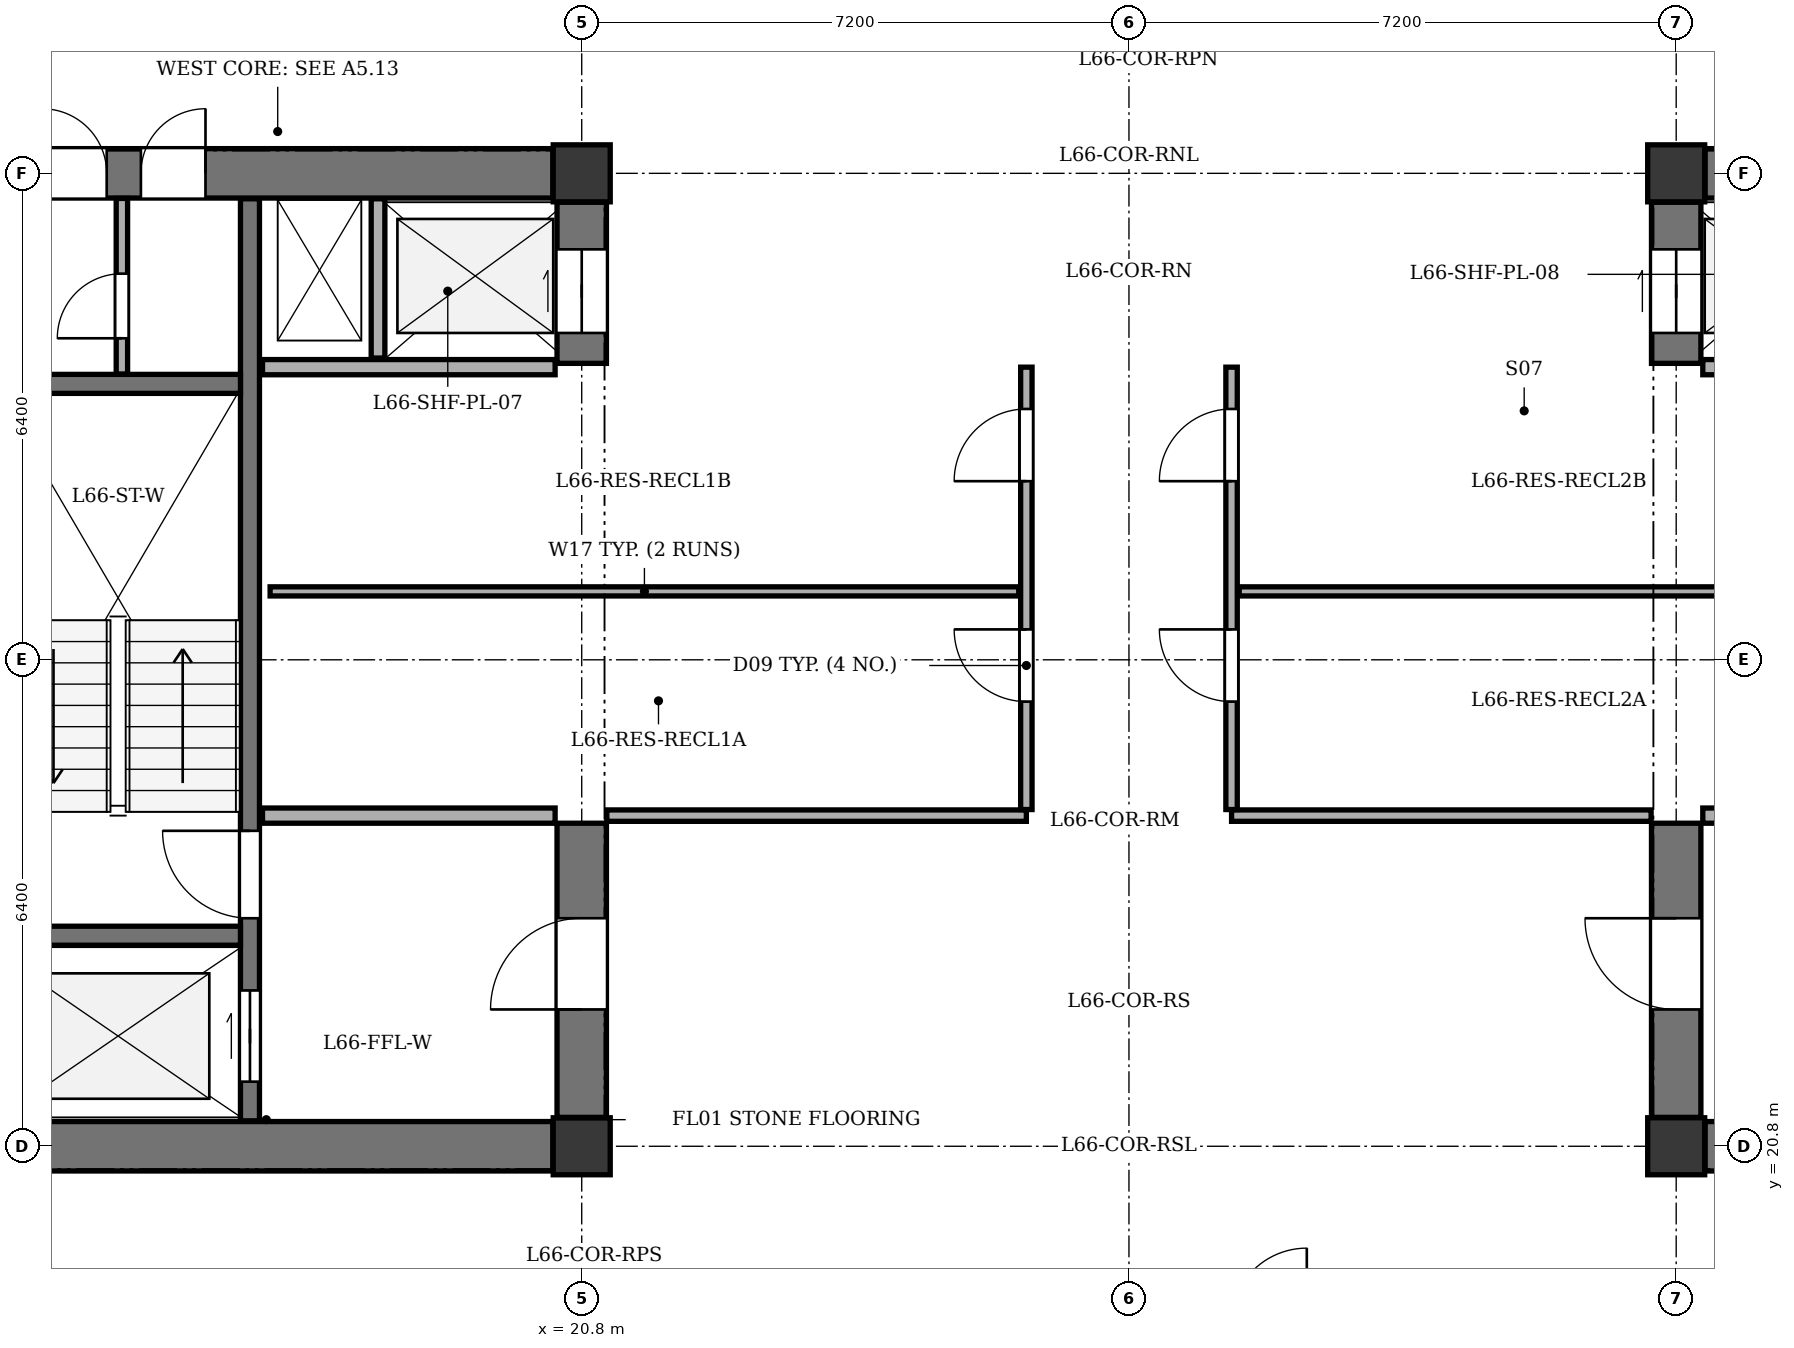
"""IFC4 building model, lengths in metres.
Left out: names, types, materials, properties, quantities, classifications, styles, units other than length and angle.
Written with IfcOpenShell. Run it as: python <this file> out.ifc"""

import sys

from ifc_helpers import new_model, si_unit, direction, frame, frame_2d, origin, origin_2d, place, context, subcontext, project, spatial, rectangle, extrude, element, fill, save


model = new_model("IFC4")
c1 = context("Model", 3, precision=1e-05, world=origin(), true_north=direction((0.0, 1.0)))
c2 = subcontext(c1, "Body", "Model", "MODEL_VIEW")
j1 = project(units=[si_unit("LENGTHUNIT", "METRE"), si_unit("PLANEANGLEUNIT", "RADIAN")], contexts=[c1])
p1 = place(None, origin())
s1 = spatial("IfcSite", under=j1, at=p1, CompositionType="ELEMENT")
p2 = place(p1, origin())
s2 = spatial("IfcBuilding", under=s1, at=p2, CompositionType="ELEMENT")
p3 = place(p2, frame((0.0, 0.0, 251.7)))
s3 = spatial("IfcBuildingStorey", under=s2, at=p3, CompositionType="ELEMENT", Elevation=251.7)
for number, where, z_axis, x_axis in (
    (1, (20.8, 20.8, 0.0), (0.0, 0.0, 1.0), (1.0, 0.0, 0.0)),
    (2, (20.8, 33.6, 0.0), (0.0, 0.0, 1.0), (1.0, 0.0, 0.0)),
    (3, (35.2, 20.8, 0.0), (0.0, 0.0, 1.0), (1.0, 0.0, 0.0)),
    (4, (35.2, 33.6, 0.0), (0.0, 0.0, 1.0), (1.0, 0.0, 0.0)),
):
    element("IfcColumn", number, at=place(p3, frame(where, z_axis=z_axis, x_axis=x_axis)), inside=s3, PredefinedType="COLUMN", context=c2, shape_type="SweptSolid", body=[
        extrude(rectangle(XDim=0.75, YDim=0.75, at=origin_2d()), origin(), (0.0, 0.0, 1.0), 3.4),
    ])
p4 = place(p3, frame((14.7, 16.03, 0.0), z_axis=(0.0, 0.0, 1.0), x_axis=(-0.707106781187, 0.707106781187, 0.0)))
e5 = element("IfcWall", 5, at=p4, inside=s3, PredefinedType="STANDARD", context=c2, shape_type="SweptSolid", body=[
    extrude(rectangle(XDim=5.402, YDim=0.32, at=frame_2d((2.701, 0.0))), origin(), (0.0, 0.0, 1.0), 2.725),
])
p5 = place(p4, frame((2.001, 0.0, 0.75)))
e6 = element("IfcOpeningElement", 6, at=p5, cuts=e5, PredefinedType="OPENING", context=c2, shape_type="SweptSolid", body=[
    extrude(rectangle(XDim=1.4, YDim=1.65, at=frame_2d((0.7, 0.825))), frame((0.0, 0.17, 0.0), z_axis=(0.0, -1.0, 0.0), x_axis=(1.0, 0.0, 0.0)), (0.0, 0.0, 1.0), 0.34),
])
p6 = place(p3, frame((13.18, 20.8, 0.0), z_axis=(0.0, 0.0, 1.0), x_axis=(1.0, 0.0, 0.0)))
e7 = element("IfcWall", 7, at=p6, inside=s3, PredefinedType="SHEAR", context=c2, shape_type="SweptSolid", body=[
    extrude(rectangle(XDim=7.24, YDim=0.65, at=frame_2d((3.62, 0.0))), origin(), (0.0, 0.0, 1.0), 3.1),
])
p7 = place(p3, frame((13.18, 33.6, 0.0), z_axis=(0.0, 0.0, 1.0), x_axis=(1.0, 0.0, 0.0)))
e8 = element("IfcWall", 8, at=p7, inside=s3, PredefinedType="SHEAR", context=c2, shape_type="SweptSolid", body=[
    extrude(rectangle(XDim=7.24, YDim=0.65, at=frame_2d((3.62, 0.0))), origin(), (0.0, 0.0, 1.0), 3.1),
])
p8 = place(p7, frame((0.52, 0.0, 0.0)))
e9 = element("IfcOpeningElement", 9, at=p8, cuts=e8, PredefinedType="OPENING", context=c2, shape_type="SweptSolid", body=[
    extrude(rectangle(XDim=0.85, YDim=2.02, at=frame_2d((0.425, 1.01))), frame((0.0, 0.335, 0.0), z_axis=(0.0, -1.0, 0.0), x_axis=(1.0, 0.0, 0.0)), (0.0, 0.0, 1.0), 0.67),
])
p9 = place(p7, frame((1.82, 0.0, 0.0)))
e10 = element("IfcOpeningElement", 10, at=p9, cuts=e8, PredefinedType="OPENING", context=c2, shape_type="SweptSolid", body=[
    extrude(rectangle(XDim=0.85, YDim=2.02, at=frame_2d((0.425, 1.01))), frame((0.0, 0.335, 0.0), z_axis=(0.0, -1.0, 0.0), x_axis=(1.0, 0.0, 0.0)), (0.0, 0.0, 1.0), 0.67),
])
p10 = place(p3, frame((20.8, 21.18, 0.0), z_axis=(0.0, 0.0, 1.0), x_axis=(0.0, 1.0, 0.0)))
e11 = element("IfcWall", 11, at=p10, inside=s3, PredefinedType="SHEAR", context=c2, shape_type="SweptSolid", body=[
    extrude(rectangle(XDim=3.87, YDim=0.65, at=frame_2d((1.935, 0.0))), origin(), (0.0, 0.0, 1.0), 3.1),
])
p11 = place(p10, frame((1.42, 0.0, 0.0)))
e12 = element("IfcOpeningElement", 12, at=p11, cuts=e11, PredefinedType="OPENING", context=c2, shape_type="SweptSolid", body=[
    extrude(rectangle(XDim=1.2, YDim=2.15, at=frame_2d((0.6, 1.075))), frame((0.0, 0.335, 0.0), z_axis=(0.0, -1.0, 0.0), x_axis=(1.0, 0.0, 0.0)), (0.0, 0.0, 1.0), 0.67),
])
p12 = place(p3, frame((20.8, 31.1, 0.0), z_axis=(0.0, 0.0, 1.0), x_axis=(0.0, 1.0, 0.0)))
e13 = element("IfcWall", 13, at=p12, inside=s3, PredefinedType="SHEAR", context=c2, shape_type="SweptSolid", body=[
    extrude(rectangle(XDim=2.12, YDim=0.65, at=frame_2d((1.06, 0.0))), origin(), (0.0, 0.0, 1.0), 3.1),
])
p13 = place(p12, frame((0.4, 0.0, 0.0)))
e14 = element("IfcOpeningElement", 14, at=p13, cuts=e13, PredefinedType="OPENING", context=c2, shape_type="SweptSolid", body=[
    extrude(rectangle(XDim=1.1, YDim=2.1, at=frame_2d((0.55, 1.05))), frame((0.0, 0.335, 0.0), z_axis=(0.0, -1.0, 0.0), x_axis=(1.0, 0.0, 0.0)), (0.0, 0.0, 1.0), 0.67),
])
p14 = place(p3, frame((16.435, 21.135, 0.0), z_axis=(0.0, 0.0, 1.0), x_axis=(0.0, 1.0, 0.0)))
e15 = element("IfcWall", 15, at=p14, inside=s3, PredefinedType="SHEAR", context=c2, shape_type="SweptSolid", body=[
    extrude(rectangle(XDim=12.13, YDim=0.25, at=frame_2d((6.065, 0.0))), origin(), (0.0, 0.0, 1.0), 3.1),
])
p15 = place(p14, frame((0.515, 0.0, 0.0)))
e16 = element("IfcOpeningElement", 16, at=p15, cuts=e15, PredefinedType="OPENING", context=c2, shape_type="SweptSolid", body=[
    extrude(rectangle(XDim=1.2, YDim=2.15, at=frame_2d((0.6, 1.075))), frame((0.0, 0.135, 0.0), z_axis=(0.0, -1.0, 0.0), x_axis=(1.0, 0.0, 0.0)), (0.0, 0.0, 1.0), 0.27),
])
p16 = place(p14, frame((2.665, 0.0, 0.0)))
e17 = element("IfcOpeningElement", 17, at=p16, cuts=e15, PredefinedType="OPENING", context=c2, shape_type="SweptSolid", body=[
    extrude(rectangle(XDim=1.15, YDim=2.15, at=frame_2d((0.575, 1.075))), frame((0.0, 0.135, 0.0), z_axis=(0.0, -1.0, 0.0), x_axis=(1.0, 0.0, 0.0)), (0.0, 0.0, 1.0), 0.27),
])
for number, where, z_axis, x_axis in (
    (18, (13.135, 23.57, 0.0), (0.0, 0.0, 1.0), (1.0, 0.0, 0.0)),
    (19, (13.135, 30.83, 0.0), (0.0, 0.0, 1.0), (1.0, 0.0, 0.0)),
):
    element("IfcWall", number, at=place(p3, frame(where, z_axis=z_axis, x_axis=x_axis)), inside=s3, PredefinedType="SHEAR", context=c2, shape_type="SweptSolid", body=[
        extrude(rectangle(XDim=3.175, YDim=0.25, at=frame_2d((1.587, 0.0))), origin(), (0.0, 0.0, 1.0), 3.1),
    ])
for number, where, z_axis, x_axis in (
    (20, (16.6, 25.15, 0.0), (0.0, 0.0, 1.0), (1.0, 0.0, 0.0)),
    (21, (16.6, 31.05, 0.0), (0.0, 0.0, 1.0), (1.0, 0.0, 0.0)),
):
    element("IfcWall", number, at=place(p3, frame(where, z_axis=z_axis, x_axis=x_axis)), inside=s3, PredefinedType="SOLIDWALL", context=c2, shape_type="SweptSolid", body=[
        extrude(rectangle(XDim=3.85, YDim=0.2, at=frame_2d((1.925, 0.0))), origin(), (0.0, 0.0, 1.0), 3.1),
    ])
p17 = place(p3, frame((18.12, 31.17, 0.0), z_axis=(0.0, 0.0, 1.0), x_axis=(0.0, 1.0, 0.0)))
e22 = element("IfcWall", 22, at=p17, inside=s3, PredefinedType="PARTITIONING", context=c2, shape_type="SweptSolid", body=[
    extrude(rectangle(XDim=2.095, YDim=0.18, at=frame_2d((1.047, 0.0))), origin(), (0.0, 0.0, 1.0), 3.1),
])
p18 = place(p3, frame((35.58, 20.8, 0.0), z_axis=(0.0, 0.0, 1.0), x_axis=(1.0, 0.0, 0.0)))
e23 = element("IfcWall", 23, at=p18, inside=s3, PredefinedType="SHEAR", context=c2, shape_type="SweptSolid", body=[
    extrude(rectangle(XDim=7.24, YDim=0.65, at=frame_2d((3.62, 0.0))), origin(), (0.0, 0.0, 1.0), 3.1),
])
p19 = place(p3, frame((35.58, 33.6, 0.0), z_axis=(0.0, 0.0, 1.0), x_axis=(1.0, 0.0, 0.0)))
e24 = element("IfcWall", 24, at=p19, inside=s3, PredefinedType="SHEAR", context=c2, shape_type="SweptSolid", body=[
    extrude(rectangle(XDim=7.24, YDim=0.65, at=frame_2d((3.62, 0.0))), origin(), (0.0, 0.0, 1.0), 3.1),
])
p20 = place(p19, frame((4.82, 0.0, 0.0)))
e25 = element("IfcOpeningElement", 25, at=p20, cuts=e24, PredefinedType="OPENING", context=c2, shape_type="SweptSolid", body=[
    extrude(rectangle(XDim=1.3, YDim=2.15, at=frame_2d((0.65, 1.075))), frame((0.0, 0.335, 0.0), z_axis=(0.0, -1.0, 0.0), x_axis=(1.0, 0.0, 0.0)), (0.0, 0.0, 1.0), 0.67),
])
p21 = place(p19, frame((2.62, 0.0, 0.0)))
e26 = element("IfcOpeningElement", 26, at=p21, cuts=e24, PredefinedType="OPENING", context=c2, shape_type="SweptSolid", body=[
    extrude(rectangle(XDim=0.85, YDim=2.02, at=frame_2d((0.425, 1.01))), frame((0.0, 0.335, 0.0), z_axis=(0.0, -1.0, 0.0), x_axis=(1.0, 0.0, 0.0)), (0.0, 0.0, 1.0), 0.67),
])
p22 = place(p3, frame((35.2, 21.18, 0.0), z_axis=(0.0, 0.0, 1.0), x_axis=(0.0, 1.0, 0.0)))
e27 = element("IfcWall", 27, at=p22, inside=s3, PredefinedType="SHEAR", context=c2, shape_type="SweptSolid", body=[
    extrude(rectangle(XDim=3.87, YDim=0.65, at=frame_2d((1.935, 0.0))), origin(), (0.0, 0.0, 1.0), 3.1),
])
p23 = place(p22, frame((1.42, 0.0, 0.0)))
e28 = element("IfcOpeningElement", 28, at=p23, cuts=e27, PredefinedType="OPENING", context=c2, shape_type="SweptSolid", body=[
    extrude(rectangle(XDim=1.2, YDim=2.15, at=frame_2d((0.6, 1.075))), frame((0.0, 0.335, 0.0), z_axis=(0.0, -1.0, 0.0), x_axis=(1.0, 0.0, 0.0)), (0.0, 0.0, 1.0), 0.67),
])
p24 = place(p3, frame((35.2, 31.1, 0.0), z_axis=(0.0, 0.0, 1.0), x_axis=(0.0, 1.0, 0.0)))
e29 = element("IfcWall", 29, at=p24, inside=s3, PredefinedType="SHEAR", context=c2, shape_type="SweptSolid", body=[
    extrude(rectangle(XDim=2.12, YDim=0.65, at=frame_2d((1.06, 0.0))), origin(), (0.0, 0.0, 1.0), 3.1),
])
p25 = place(p24, frame((0.4, 0.0, 0.0)))
e30 = element("IfcOpeningElement", 30, at=p25, cuts=e29, PredefinedType="OPENING", context=c2, shape_type="SweptSolid", body=[
    extrude(rectangle(XDim=1.1, YDim=2.1, at=frame_2d((0.55, 1.05))), frame((0.0, 0.335, 0.0), z_axis=(0.0, -1.0, 0.0), x_axis=(1.0, 0.0, 0.0)), (0.0, 0.0, 1.0), 0.67),
])
p26 = place(p3, frame((35.55, 25.15, 0.0), z_axis=(0.0, 0.0, 1.0), x_axis=(1.0, 0.0, 0.0)))
e31 = element("IfcWall", 31, at=p26, inside=s3, PredefinedType="SOLIDWALL", context=c2, shape_type="SweptSolid", body=[
    extrude(rectangle(XDim=3.85, YDim=0.2, at=frame_2d((1.925, 0.0))), origin(), (0.0, 0.0, 1.0), 3.1),
])
p27 = place(p3, frame((35.55, 31.05, 0.0), z_axis=(0.0, 0.0, 1.0), x_axis=(1.0, 0.0, 0.0)))
e32 = element("IfcWall", 32, at=p27, inside=s3, PredefinedType="SOLIDWALL", context=c2, shape_type="SweptSolid", body=[
    extrude(rectangle(XDim=2.25, YDim=0.2, at=frame_2d((1.125, 0.0))), origin(), (0.0, 0.0, 1.0), 3.1),
])
p28 = place(p3, frame((14.75, 30.96, 0.0), z_axis=(0.0, 0.0, 1.0), x_axis=(0.0, 1.0, 0.0)))
e33 = element("IfcWall", 33, at=p28, inside=s3, PredefinedType="PARTITIONING", context=c2, shape_type="SweptSolid", body=[
    extrude(rectangle(XDim=2.31, YDim=0.15, at=frame_2d((1.155, 0.0))), origin(), (0.0, 0.0, 1.0), 3.1),
])
p29 = place(p28, frame((0.47, 0.0, 0.0)))
e34 = element("IfcOpeningElement", 34, at=p29, cuts=e33, PredefinedType="OPENING", context=c2, shape_type="SweptSolid", body=[
    extrude(rectangle(XDim=0.85, YDim=2.02, at=frame_2d((0.425, 1.01))), frame((0.0, 0.085, 0.0), z_axis=(0.0, -1.0, 0.0), x_axis=(1.0, 0.0, 0.0)), (0.0, 0.0, 1.0), 0.17),
])
for number, where, z_axis, x_axis in (
    (35, (21.13, 25.15, 0.0), (0.0, 0.0, 1.0), (1.0, 0.0, 0.0)),
    (36, (29.35, 25.15, 0.0), (0.0, 0.0, 1.0), (1.0, 0.0, 0.0)),
):
    element("IfcWall", number, at=place(p3, frame(where, z_axis=z_axis, x_axis=x_axis)), inside=s3, PredefinedType="PARTITIONING", context=c2, shape_type="SweptSolid", body=[
        extrude(rectangle(XDim=5.52, YDim=0.15, at=frame_2d((2.76, 0.0))), origin(), (0.0, 0.0, 1.0), 3.1),
    ])
p30 = place(p3, frame((26.65, 25.23, 0.0), z_axis=(0.0, 0.0, 1.0), x_axis=(0.0, 1.0, 0.0)))
e37 = element("IfcWall", 37, at=p30, inside=s3, PredefinedType="PARTITIONING", context=c2, shape_type="SweptSolid", body=[
    extrude(rectangle(XDim=5.82, YDim=0.15, at=frame_2d((2.91, 0.0))), origin(), (0.0, 0.0, 1.0), 3.1),
])
p31 = place(p30, frame((1.42, 0.0, 0.0)))
e38 = element("IfcOpeningElement", 38, at=p31, cuts=e37, PredefinedType="OPENING", context=c2, shape_type="SweptSolid", body=[
    extrude(rectangle(XDim=0.95, YDim=2.1, at=frame_2d((0.475, 1.05))), frame((0.0, 0.085, 0.0), z_axis=(0.0, -1.0, 0.0), x_axis=(1.0, 0.0, 0.0)), (0.0, 0.0, 1.0), 0.17),
])
p32 = place(p30, frame((4.32, 0.0, 0.0)))
e39 = element("IfcOpeningElement", 39, at=p32, cuts=e37, PredefinedType="OPENING", context=c2, shape_type="SweptSolid", body=[
    extrude(rectangle(XDim=0.95, YDim=2.1, at=frame_2d((0.475, 1.05))), frame((0.0, 0.085, 0.0), z_axis=(0.0, -1.0, 0.0), x_axis=(1.0, 0.0, 0.0)), (0.0, 0.0, 1.0), 0.17),
])
p33 = place(p3, frame((16.7, 28.1, 0.0), z_axis=(0.0, 0.0, 1.0), x_axis=(1.0, 0.0, 0.0)))
e40 = element("IfcWall", 40, at=p33, inside=s3, PredefinedType="PARTITIONING", context=c2, shape_type="SweptSolid", body=[
    extrude(rectangle(XDim=9.85, YDim=0.12, at=frame_2d((4.925, 0.0))), origin(), (0.0, 0.0, 1.0), 3.1),
])
p34 = place(p3, frame((29.35, 25.23, 0.0), z_axis=(0.0, 0.0, 1.0), x_axis=(0.0, 1.0, 0.0)))
e41 = element("IfcWall", 41, at=p34, inside=s3, PredefinedType="PARTITIONING", context=c2, shape_type="SweptSolid", body=[
    extrude(rectangle(XDim=5.82, YDim=0.15, at=frame_2d((2.91, 0.0))), origin(), (0.0, 0.0, 1.0), 3.1),
])
p35 = place(p34, frame((1.42, 0.0, 0.0)))
e42 = element("IfcOpeningElement", 42, at=p35, cuts=e41, PredefinedType="OPENING", context=c2, shape_type="SweptSolid", body=[
    extrude(rectangle(XDim=0.95, YDim=2.1, at=frame_2d((0.475, 1.05))), frame((0.0, 0.085, 0.0), z_axis=(0.0, -1.0, 0.0), x_axis=(1.0, 0.0, 0.0)), (0.0, 0.0, 1.0), 0.17),
])
p36 = place(p34, frame((4.32, 0.0, 0.0)))
e43 = element("IfcOpeningElement", 43, at=p36, cuts=e41, PredefinedType="OPENING", context=c2, shape_type="SweptSolid", body=[
    extrude(rectangle(XDim=0.95, YDim=2.1, at=frame_2d((0.475, 1.05))), frame((0.0, 0.085, 0.0), z_axis=(0.0, -1.0, 0.0), x_axis=(1.0, 0.0, 0.0)), (0.0, 0.0, 1.0), 0.17),
])
p37 = place(p3, frame((29.45, 28.1, 0.0), z_axis=(0.0, 0.0, 1.0), x_axis=(1.0, 0.0, 0.0)))
e44 = element("IfcWall", 44, at=p37, inside=s3, PredefinedType="PARTITIONING", context=c2, shape_type="SweptSolid", body=[
    extrude(rectangle(XDim=8.345, YDim=0.12, at=frame_2d((4.172, 0.0))), origin(), (0.0, 0.0, 1.0), 3.1),
])
p38 = place(p8, origin())
e45 = element("IfcDoor", 45, at=p38, inside=s3, OperationType="SINGLE_SWING_LEFT", PredefinedType="DOOR", context=c2, shape_type="SweptSolid", body=[
    extrude(rectangle(XDim=0.85, YDim=2.02, at=frame_2d((0.425, 1.01))), frame((0.0, 0.025, 0.0), z_axis=(0.0, -1.0, 0.0), x_axis=(1.0, 0.0, 0.0)), (0.0, 0.0, 1.0), 0.05),
])
fill(e9, e45)
p39 = place(p9, origin())
e46 = element("IfcDoor", 46, at=p39, inside=s3, OperationType="SINGLE_SWING_RIGHT", PredefinedType="DOOR", context=c2, shape_type="SweptSolid", body=[
    extrude(rectangle(XDim=0.85, YDim=2.02, at=frame_2d((0.425, 1.01))), frame((0.0, 0.025, 0.0), z_axis=(0.0, -1.0, 0.0), x_axis=(1.0, 0.0, 0.0)), (0.0, 0.0, 1.0), 0.05),
])
fill(e10, e46)
p40 = place(p11, origin())
e47 = element("IfcDoor", 47, at=p40, inside=s3, OperationType="SINGLE_SWING_LEFT", PredefinedType="DOOR", context=c2, shape_type="SweptSolid", body=[
    extrude(rectangle(XDim=1.2, YDim=2.15, at=frame_2d((0.6, 1.075))), frame((0.0, 0.025, 0.0), z_axis=(0.0, -1.0, 0.0), x_axis=(1.0, 0.0, 0.0)), (0.0, 0.0, 1.0), 0.05),
])
fill(e12, e47)
p41 = place(p13, origin())
e48 = element("IfcDoor", 48, at=p41, inside=s3, OperationType="DOUBLE_DOOR_SLIDING", PredefinedType="DOOR", context=c2, shape_type="SweptSolid", body=[
    extrude(rectangle(XDim=1.1, YDim=2.1, at=frame_2d((0.55, 1.05))), frame((0.0, 0.025, 0.0), z_axis=(0.0, -1.0, 0.0), x_axis=(1.0, 0.0, 0.0)), (0.0, 0.0, 1.0), 0.05),
])
fill(e14, e48)
p42 = place(p15, origin())
e49 = element("IfcDoor", 49, at=p42, inside=s3, OperationType="DOUBLE_DOOR_SLIDING", PredefinedType="DOOR", context=c2, shape_type="SweptSolid", body=[
    extrude(rectangle(XDim=1.2, YDim=2.15, at=frame_2d((0.6, 1.075))), frame((0.0, 0.025, 0.0), z_axis=(0.0, -1.0, 0.0), x_axis=(1.0, 0.0, 0.0)), (0.0, 0.0, 1.0), 0.05),
])
fill(e16, e49)
p43 = place(p16, origin())
e50 = element("IfcDoor", 50, at=p43, inside=s3, OperationType="SINGLE_SWING_RIGHT", PredefinedType="DOOR", context=c2, shape_type="SweptSolid", body=[
    extrude(rectangle(XDim=1.15, YDim=2.15, at=frame_2d((0.575, 1.075))), frame((0.0, 0.025, 0.0), z_axis=(0.0, -1.0, 0.0), x_axis=(1.0, 0.0, 0.0)), (0.0, 0.0, 1.0), 0.05),
])
fill(e17, e50)
p44 = place(p23, origin())
e51 = element("IfcDoor", 51, at=p44, inside=s3, OperationType="SINGLE_SWING_RIGHT", PredefinedType="DOOR", context=c2, shape_type="SweptSolid", body=[
    extrude(rectangle(XDim=1.2, YDim=2.15, at=frame_2d((0.6, 1.075))), frame((0.0, 0.025, 0.0), z_axis=(0.0, -1.0, 0.0), x_axis=(1.0, 0.0, 0.0)), (0.0, 0.0, 1.0), 0.05),
])
fill(e28, e51)
p45 = place(p25, origin())
e52 = element("IfcDoor", 52, at=p45, inside=s3, OperationType="DOUBLE_DOOR_SLIDING", PredefinedType="DOOR", context=c2, shape_type="SweptSolid", body=[
    extrude(rectangle(XDim=1.1, YDim=2.1, at=frame_2d((0.55, 1.05))), frame((0.0, 0.025, 0.0), z_axis=(0.0, -1.0, 0.0), x_axis=(1.0, 0.0, 0.0)), (0.0, 0.0, 1.0), 0.05),
])
fill(e30, e52)
p46 = place(p29, origin())
e53 = element("IfcDoor", 53, at=p46, inside=s3, OperationType="SINGLE_SWING_LEFT", PredefinedType="DOOR", context=c2, shape_type="SweptSolid", body=[
    extrude(rectangle(XDim=0.85, YDim=2.02, at=frame_2d((0.425, 1.01))), frame((0.0, 0.025, 0.0), z_axis=(0.0, -1.0, 0.0), x_axis=(1.0, 0.0, 0.0)), (0.0, 0.0, 1.0), 0.05),
])
fill(e34, e53)
p47 = place(p31, origin())
e54 = element("IfcDoor", 54, at=p47, inside=s3, OperationType="SINGLE_SWING_RIGHT", PredefinedType="DOOR", context=c2, shape_type="SweptSolid", body=[
    extrude(rectangle(XDim=0.95, YDim=2.1, at=frame_2d((0.475, 1.05))), frame((0.0, 0.025, 0.0), z_axis=(0.0, -1.0, 0.0), x_axis=(1.0, 0.0, 0.0)), (0.0, 0.0, 1.0), 0.05),
])
fill(e38, e54)
p48 = place(p32, origin())
e55 = element("IfcDoor", 55, at=p48, inside=s3, OperationType="SINGLE_SWING_LEFT", PredefinedType="DOOR", context=c2, shape_type="SweptSolid", body=[
    extrude(rectangle(XDim=0.95, YDim=2.1, at=frame_2d((0.475, 1.05))), frame((0.0, 0.025, 0.0), z_axis=(0.0, -1.0, 0.0), x_axis=(1.0, 0.0, 0.0)), (0.0, 0.0, 1.0), 0.05),
])
fill(e39, e55)
p49 = place(p35, origin())
e56 = element("IfcDoor", 56, at=p49, inside=s3, OperationType="SINGLE_SWING_RIGHT", PredefinedType="DOOR", context=c2, shape_type="SweptSolid", body=[
    extrude(rectangle(XDim=0.95, YDim=2.1, at=frame_2d((0.475, 1.05))), frame((0.0, 0.025, 0.0), z_axis=(0.0, -1.0, 0.0), x_axis=(1.0, 0.0, 0.0)), (0.0, 0.0, 1.0), 0.05),
])
fill(e42, e56)
p50 = place(p36, origin())
e57 = element("IfcDoor", 57, at=p50, inside=s3, OperationType="SINGLE_SWING_LEFT", PredefinedType="DOOR", context=c2, shape_type="SweptSolid", body=[
    extrude(rectangle(XDim=0.95, YDim=2.1, at=frame_2d((0.475, 1.05))), frame((0.0, 0.025, 0.0), z_axis=(0.0, -1.0, 0.0), x_axis=(1.0, 0.0, 0.0)), (0.0, 0.0, 1.0), 0.05),
])
fill(e43, e57)
save(model, sys.argv[1])
